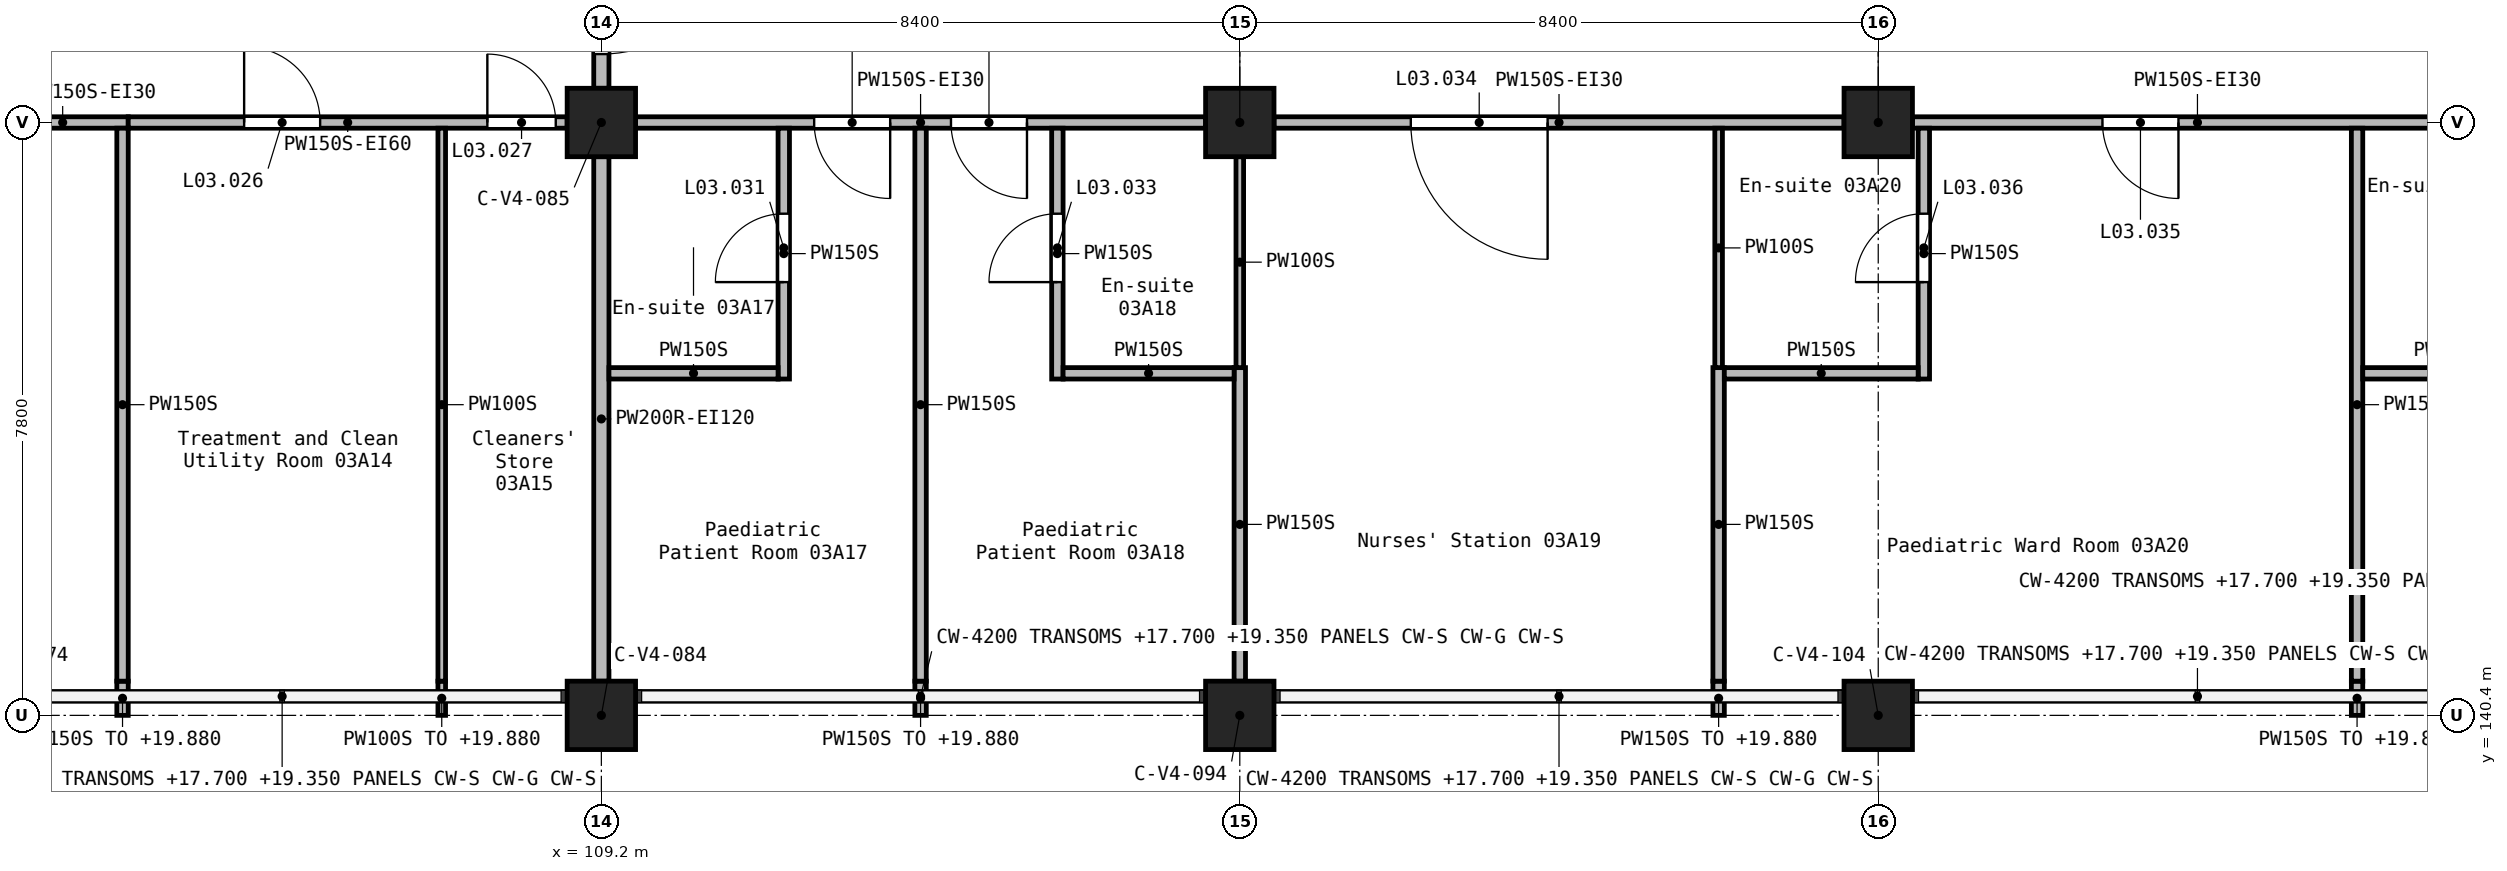
"""IFC4 building model, lengths in metres.
Left out: names, types, materials, properties, quantities, classifications, styles, units other than length and angle.
Written with IfcOpenShell. Run it as: python <this file> out.ifc"""

import sys

from ifc_helpers import new_model, si_unit, direction, frame, frame_2d, origin, origin_2d, place, context, subcontext, project, spatial, rectangle, extrude, element, fill, save


model = new_model("IFC4")
c1 = context("Model", 3, precision=1e-05, world=origin(), true_north=direction((0.0, 1.0)))
c2 = subcontext(c1, "Body", "Model", "MODEL_VIEW")
j1 = project(units=[si_unit("LENGTHUNIT", "METRE"), si_unit("PLANEANGLEUNIT", "RADIAN")], contexts=[c1])
p1 = place(None, origin())
s1 = spatial("IfcSite", under=j1, at=p1, CompositionType="ELEMENT")
p2 = place(p1, origin())
s2 = spatial("IfcBuilding", under=s1, at=p2, CompositionType="ELEMENT")
p3 = place(p2, frame((0.0, 0.0, 16.8)))
s3 = spatial("IfcBuildingStorey", under=s2, at=p3, CompositionType="ELEMENT", Elevation=16.8)
for number, where, z_axis, x_axis in (
    (1, (109.2, 140.4, 0.0), (0.0, 0.0, 1.0), (1.0, 0.0, 0.0)),
    (2, (109.2, 148.2, 0.0), (0.0, 0.0, 1.0), (1.0, 0.0, 0.0)),
    (3, (117.6, 140.4, 0.0), (0.0, 0.0, 1.0), (1.0, 0.0, 0.0)),
    (4, (117.6, 148.2, 0.0), (0.0, 0.0, 1.0), (1.0, 0.0, 0.0)),
    (5, (126.0, 140.4, 0.0), (0.0, 0.0, 1.0), (1.0, 0.0, 0.0)),
    (6, (126.0, 148.2, 0.0), (0.0, 0.0, 1.0), (1.0, 0.0, 0.0)),
):
    element("IfcColumn", number, at=place(p3, frame(where, z_axis=z_axis, x_axis=x_axis)), inside=s3, PredefinedType="COLUMN", context=c2, shape_type="SweptSolid", body=[
        extrude(rectangle(XDim=0.9, YDim=0.9, at=origin_2d()), origin(), (0.0, 0.0, 1.0), 4.2),
    ])
p4 = place(p3, frame((109.2, 151.35, 0.0), z_axis=(0.0, 0.0, 1.0), x_axis=(0.0, -1.0, 0.0)))
e7 = element("IfcWall", 7, at=p4, inside=s3, PredefinedType="SOLIDWALL", context=c2, shape_type="SweptSolid", body=[
    extrude(rectangle(XDim=2.7, YDim=0.2, at=frame_2d((1.35, 0.0))), origin(), (0.0, 0.0, 1.0), 3.9),
])
p5 = place(p4, frame((0.45, 0.0, 0.0)))
e8 = element("IfcOpeningElement", 8, at=p5, cuts=e7, PredefinedType="OPENING", context=c2, shape_type="SweptSolid", body=[
    extrude(rectangle(XDim=1.8, YDim=2.1, at=frame_2d((0.9, 1.05))), frame((0.0, 0.11, 0.0), z_axis=(0.0, -1.0, 0.0), x_axis=(1.0, 0.0, 0.0)), (0.0, 0.0, 1.0), 0.22),
])
p6 = place(p3, frame((109.2, 147.75, 0.0), z_axis=(0.0, 0.0, 1.0), x_axis=(0.0, -1.0, 0.0)))
e9 = element("IfcWall", 9, at=p6, inside=s3, PredefinedType="SOLIDWALL", context=c2, shape_type="SweptSolid", body=[
    extrude(rectangle(XDim=6.9, YDim=0.2, at=frame_2d((3.45, 0.0))), origin(), (0.0, 0.0, 1.0), 3.9),
])
p7 = place(p3, frame((133.95, 148.2, 0.0), z_axis=(0.0, 0.0, 1.0), x_axis=(-1.0, 0.0, 0.0)))
e10 = element("IfcWall", 10, at=p7, inside=s3, PredefinedType="PARTITIONING", context=c2, shape_type="SweptSolid", body=[
    extrude(rectangle(XDim=7.5, YDim=0.15, at=frame_2d((3.75, 0.0))), origin(), (0.0, 0.0, 1.0), 3.9),
])
p8 = place(p7, frame((4.0, 0.0, 0.0)))
e11 = element("IfcOpeningElement", 11, at=p8, cuts=e10, PredefinedType="OPENING", context=c2, shape_type="SweptSolid", body=[
    extrude(rectangle(XDim=1.0, YDim=2.1, at=frame_2d((0.5, 1.05))), frame((0.0, 0.085, 0.0), z_axis=(0.0, -1.0, 0.0), x_axis=(1.0, 0.0, 0.0)), (0.0, 0.0, 1.0), 0.17),
])
p9 = place(p3, frame((125.55, 148.2, 0.0), z_axis=(0.0, 0.0, 1.0), x_axis=(-1.0, 0.0, 0.0)))
e12 = element("IfcWall", 12, at=p9, inside=s3, PredefinedType="PARTITIONING", context=c2, shape_type="SweptSolid", body=[
    extrude(rectangle(XDim=7.5, YDim=0.15, at=frame_2d((3.75, 0.0))), origin(), (0.0, 0.0, 1.0), 3.9),
])
p10 = place(p9, frame((3.9, 0.0, 0.0)))
e13 = element("IfcOpeningElement", 13, at=p10, cuts=e12, PredefinedType="OPENING", context=c2, shape_type="SweptSolid", body=[
    extrude(rectangle(XDim=1.8, YDim=2.1, at=frame_2d((0.9, 1.05))), frame((0.0, 0.085, 0.0), z_axis=(0.0, -1.0, 0.0), x_axis=(1.0, 0.0, 0.0)), (0.0, 0.0, 1.0), 0.17),
])
p11 = place(p3, frame((117.15, 148.2, 0.0), z_axis=(0.0, 0.0, 1.0), x_axis=(-1.0, 0.0, 0.0)))
e14 = element("IfcWall", 14, at=p11, inside=s3, PredefinedType="PARTITIONING", context=c2, shape_type="SweptSolid", body=[
    extrude(rectangle(XDim=7.5, YDim=0.15, at=frame_2d((3.75, 0.0))), origin(), (0.0, 0.0, 1.0), 3.9),
])
p12 = place(p11, frame((4.15, 0.0, 0.0)))
e15 = element("IfcOpeningElement", 15, at=p12, cuts=e14, PredefinedType="OPENING", context=c2, shape_type="SweptSolid", body=[
    extrude(rectangle(XDim=1.0, YDim=2.1, at=frame_2d((0.5, 1.05))), frame((0.0, 0.085, 0.0), z_axis=(0.0, -1.0, 0.0), x_axis=(1.0, 0.0, 0.0)), (0.0, 0.0, 1.0), 0.17),
])
p13 = place(p11, frame((2.35, 0.0, 0.0)))
e16 = element("IfcOpeningElement", 16, at=p13, cuts=e14, PredefinedType="OPENING", context=c2, shape_type="SweptSolid", body=[
    extrude(rectangle(XDim=1.0, YDim=2.1, at=frame_2d((0.5, 1.05))), frame((0.0, 0.085, 0.0), z_axis=(0.0, -1.0, 0.0), x_axis=(1.0, 0.0, 0.0)), (0.0, 0.0, 1.0), 0.17),
])
p14 = place(p3, frame((102.975, 148.2, 0.0), z_axis=(0.0, 0.0, 1.0), x_axis=(-1.0, 0.0, 0.0)))
e17 = element("IfcWall", 17, at=p14, inside=s3, PredefinedType="PARTITIONING", context=c2, shape_type="SweptSolid", body=[
    extrude(rectangle(XDim=1.725, YDim=0.15, at=frame_2d((0.863, 0.0))), origin(), (0.0, 0.0, 1.0), 3.9),
])
p15 = place(p3, frame((102.975, 148.2, 0.0), z_axis=(0.0, 0.0, 1.0), x_axis=(1.0, 0.0, 0.0)))
e18 = element("IfcWall", 18, at=p15, inside=s3, PredefinedType="PARTITIONING", context=c2, shape_type="SweptSolid", body=[
    extrude(rectangle(XDim=5.775, YDim=0.15, at=frame_2d((2.887, 0.0))), origin(), (0.0, 0.0, 1.0), 3.9),
])
p16 = place(p15, frame((1.525, 0.0, 0.0)))
e19 = element("IfcOpeningElement", 19, at=p16, cuts=e18, PredefinedType="OPENING", context=c2, shape_type="SweptSolid", body=[
    extrude(rectangle(XDim=1.0, YDim=2.1, at=frame_2d((0.5, 1.05))), frame((0.0, 0.085, 0.0), z_axis=(0.0, -1.0, 0.0), x_axis=(1.0, 0.0, 0.0)), (0.0, 0.0, 1.0), 0.17),
])
p17 = place(p15, frame((4.725, 0.0, 0.0)))
e20 = element("IfcOpeningElement", 20, at=p17, cuts=e18, PredefinedType="OPENING", context=c2, shape_type="SweptSolid", body=[
    extrude(rectangle(XDim=0.9, YDim=2.1, at=frame_2d((0.45, 1.05))), frame((0.0, 0.085, 0.0), z_axis=(0.0, -1.0, 0.0), x_axis=(1.0, 0.0, 0.0)), (0.0, 0.0, 1.0), 0.17),
])
p18 = place(p3, frame((102.9, 140.4, 0.0), z_axis=(0.0, 0.0, 1.0), x_axis=(0.0, 1.0, 0.0)))
e21 = element("IfcWall", 21, at=p18, inside=s3, PredefinedType="PARTITIONING", context=c2, shape_type="SweptSolid", body=[
    extrude(rectangle(XDim=0.45, YDim=0.15, at=frame_2d((0.225, 0.0))), origin(), (0.0, 0.0, 1.0), 3.08),
])
p19 = place(p3, frame((102.9, 140.85, 0.0), z_axis=(0.0, 0.0, 1.0), x_axis=(0.0, 1.0, 0.0)))
e22 = element("IfcWall", 22, at=p19, inside=s3, PredefinedType="PARTITIONING", context=c2, shape_type="SweptSolid", body=[
    extrude(rectangle(XDim=7.275, YDim=0.15, at=frame_2d((3.637, 0.0))), origin(), (0.0, 0.0, 1.0), 3.9),
])
p20 = place(p3, frame((113.4, 140.4, 0.0), z_axis=(0.0, 0.0, 1.0), x_axis=(0.0, 1.0, 0.0)))
e23 = element("IfcWall", 23, at=p20, inside=s3, PredefinedType="PARTITIONING", context=c2, shape_type="SweptSolid", body=[
    extrude(rectangle(XDim=0.45, YDim=0.15, at=frame_2d((0.225, 0.0))), origin(), (0.0, 0.0, 1.0), 3.08),
])
p21 = place(p3, frame((113.4, 140.85, 0.0), z_axis=(0.0, 0.0, 1.0), x_axis=(0.0, 1.0, 0.0)))
e24 = element("IfcWall", 24, at=p21, inside=s3, PredefinedType="PARTITIONING", context=c2, shape_type="SweptSolid", body=[
    extrude(rectangle(XDim=7.275, YDim=0.15, at=frame_2d((3.637, 0.0))), origin(), (0.0, 0.0, 1.0), 3.9),
])
p22 = place(p3, frame((132.3, 140.4, 0.0), z_axis=(0.0, 0.0, 1.0), x_axis=(0.0, 1.0, 0.0)))
e25 = element("IfcWall", 25, at=p22, inside=s3, PredefinedType="PARTITIONING", context=c2, shape_type="SweptSolid", body=[
    extrude(rectangle(XDim=0.45, YDim=0.15, at=frame_2d((0.225, 0.0))), origin(), (0.0, 0.0, 1.0), 3.08),
])
p23 = place(p3, frame((132.3, 140.85, 0.0), z_axis=(0.0, 0.0, 1.0), x_axis=(0.0, 1.0, 0.0)))
e26 = element("IfcWall", 26, at=p23, inside=s3, PredefinedType="PARTITIONING", context=c2, shape_type="SweptSolid", body=[
    extrude(rectangle(XDim=7.275, YDim=0.15, at=frame_2d((3.637, 0.0))), origin(), (0.0, 0.0, 1.0), 3.9),
])
p24 = place(p3, frame((117.6, 140.85, 0.0), z_axis=(0.0, 0.0, 1.0), x_axis=(0.0, 1.0, 0.0)))
e27 = element("IfcWall", 27, at=p24, inside=s3, PredefinedType="PARTITIONING", context=c2, shape_type="SweptSolid", body=[
    extrude(rectangle(XDim=4.125, YDim=0.15, at=frame_2d((2.062, 0.0))), origin(), (0.0, 0.0, 1.0), 3.9),
])
p25 = place(p3, frame((123.9, 140.4, 0.0), z_axis=(0.0, 0.0, 1.0), x_axis=(0.0, 1.0, 0.0)))
e28 = element("IfcWall", 28, at=p25, inside=s3, PredefinedType="PARTITIONING", context=c2, shape_type="SweptSolid", body=[
    extrude(rectangle(XDim=0.45, YDim=0.15, at=frame_2d((0.225, 0.0))), origin(), (0.0, 0.0, 1.0), 3.08),
])
p26 = place(p3, frame((123.9, 140.85, 0.0), z_axis=(0.0, 0.0, 1.0), x_axis=(0.0, 1.0, 0.0)))
e29 = element("IfcWall", 29, at=p26, inside=s3, PredefinedType="PARTITIONING", context=c2, shape_type="SweptSolid", body=[
    extrude(rectangle(XDim=4.125, YDim=0.15, at=frame_2d((2.062, 0.0))), origin(), (0.0, 0.0, 1.0), 3.9),
])
p27 = place(p3, frame((111.6, 144.825, 0.0), z_axis=(0.0, 0.0, 1.0), x_axis=(0.0, 1.0, 0.0)))
e30 = element("IfcWall", 30, at=p27, inside=s3, PredefinedType="PARTITIONING", context=c2, shape_type="SweptSolid", body=[
    extrude(rectangle(XDim=3.3, YDim=0.15, at=frame_2d((1.65, 0.0))), origin(), (0.0, 0.0, 1.0), 3.9),
])
p28 = place(p27, frame((1.275, 0.0, 0.0)))
e31 = element("IfcOpeningElement", 31, at=p28, cuts=e30, PredefinedType="OPENING", context=c2, shape_type="SweptSolid", body=[
    extrude(rectangle(XDim=0.9, YDim=2.1, at=frame_2d((0.45, 1.05))), frame((0.0, 0.085, 0.0), z_axis=(0.0, -1.0, 0.0), x_axis=(1.0, 0.0, 0.0)), (0.0, 0.0, 1.0), 0.17),
])
p29 = place(p3, frame((115.2, 144.825, 0.0), z_axis=(0.0, 0.0, 1.0), x_axis=(0.0, 1.0, 0.0)))
e32 = element("IfcWall", 32, at=p29, inside=s3, PredefinedType="PARTITIONING", context=c2, shape_type="SweptSolid", body=[
    extrude(rectangle(XDim=3.3, YDim=0.15, at=frame_2d((1.65, 0.0))), origin(), (0.0, 0.0, 1.0), 3.9),
])
p30 = place(p29, frame((1.275, 0.0, 0.0)))
e33 = element("IfcOpeningElement", 33, at=p30, cuts=e32, PredefinedType="OPENING", context=c2, shape_type="SweptSolid", body=[
    extrude(rectangle(XDim=0.9, YDim=2.1, at=frame_2d((0.45, 1.05))), frame((0.0, 0.085, 0.0), z_axis=(0.0, -1.0, 0.0), x_axis=(1.0, 0.0, 0.0)), (0.0, 0.0, 1.0), 0.17),
])
p31 = place(p3, frame((126.6, 144.825, 0.0), z_axis=(0.0, 0.0, 1.0), x_axis=(0.0, 1.0, 0.0)))
e34 = element("IfcWall", 34, at=p31, inside=s3, PredefinedType="PARTITIONING", context=c2, shape_type="SweptSolid", body=[
    extrude(rectangle(XDim=3.3, YDim=0.15, at=frame_2d((1.65, 0.0))), origin(), (0.0, 0.0, 1.0), 3.9),
])
p32 = place(p31, frame((1.275, 0.0, 0.0)))
e35 = element("IfcOpeningElement", 35, at=p32, cuts=e34, PredefinedType="OPENING", context=c2, shape_type="SweptSolid", body=[
    extrude(rectangle(XDim=0.9, YDim=2.1, at=frame_2d((0.45, 1.05))), frame((0.0, 0.085, 0.0), z_axis=(0.0, -1.0, 0.0), x_axis=(1.0, 0.0, 0.0)), (0.0, 0.0, 1.0), 0.17),
])
p33 = place(p3, frame((123.975, 144.9, 0.0), z_axis=(0.0, 0.0, 1.0), x_axis=(1.0, 0.0, 0.0)))
e36 = element("IfcWall", 36, at=p33, inside=s3, PredefinedType="PARTITIONING", context=c2, shape_type="SweptSolid", body=[
    extrude(rectangle(XDim=2.55, YDim=0.15, at=frame_2d((1.275, 0.0))), origin(), (0.0, 0.0, 1.0), 3.9),
])
p34 = place(p3, frame((109.3, 144.9, 0.0), z_axis=(0.0, 0.0, 1.0), x_axis=(1.0, 0.0, 0.0)))
e37 = element("IfcWall", 37, at=p34, inside=s3, PredefinedType="PARTITIONING", context=c2, shape_type="SweptSolid", body=[
    extrude(rectangle(XDim=2.225, YDim=0.15, at=frame_2d((1.112, 0.0))), origin(), (0.0, 0.0, 1.0), 3.9),
])
for number, where, z_axis, x_axis in (
    (38, (115.275, 144.9, 0.0), (0.0, 0.0, 1.0), (1.0, 0.0, 0.0)),
    (39, (132.375, 144.9, 0.0), (0.0, 0.0, 1.0), (1.0, 0.0, 0.0)),
):
    element("IfcWall", number, at=place(p3, frame(where, z_axis=z_axis, x_axis=x_axis)), inside=s3, PredefinedType="PARTITIONING", context=c2, shape_type="SweptSolid", body=[
        extrude(rectangle(XDim=2.25, YDim=0.15, at=frame_2d((1.125, 0.0))), origin(), (0.0, 0.0, 1.0), 3.9),
    ])
p35 = place(p3, frame((107.1, 140.4, 0.0), z_axis=(0.0, 0.0, 1.0), x_axis=(0.0, 1.0, 0.0)))
e40 = element("IfcWall", 40, at=p35, inside=s3, PredefinedType="PARTITIONING", context=c2, shape_type="SweptSolid", body=[
    extrude(rectangle(XDim=0.45, YDim=0.1, at=frame_2d((0.225, 0.0))), origin(), (0.0, 0.0, 1.0), 3.08),
])
p36 = place(p3, frame((107.1, 140.85, 0.0), z_axis=(0.0, 0.0, 1.0), x_axis=(0.0, 1.0, 0.0)))
e41 = element("IfcWall", 41, at=p36, inside=s3, PredefinedType="PARTITIONING", context=c2, shape_type="SweptSolid", body=[
    extrude(rectangle(XDim=7.275, YDim=0.1, at=frame_2d((3.637, 0.0))), origin(), (0.0, 0.0, 1.0), 3.9),
])
p37 = place(p3, frame((117.6, 144.975, 0.0), z_axis=(0.0, 0.0, 1.0), x_axis=(0.0, 1.0, 0.0)))
e42 = element("IfcWall", 42, at=p37, inside=s3, PredefinedType="PARTITIONING", context=c2, shape_type="SweptSolid", body=[
    extrude(rectangle(XDim=2.775, YDim=0.1, at=frame_2d((1.387, 0.0))), origin(), (0.0, 0.0, 1.0), 3.9),
])
p38 = place(p3, frame((123.9, 144.975, 0.0), z_axis=(0.0, 0.0, 1.0), x_axis=(0.0, 1.0, 0.0)))
e43 = element("IfcWall", 43, at=p38, inside=s3, PredefinedType="PARTITIONING", context=c2, shape_type="SweptSolid", body=[
    extrude(rectangle(XDim=3.15, YDim=0.1, at=frame_2d((1.575, 0.0))), origin(), (0.0, 0.0, 1.0), 3.9),
])
p39 = place(p5, origin())
e44 = element("IfcDoor", 44, at=p39, inside=s3, OperationType="DOUBLE_DOOR_SINGLE_SWING", PredefinedType="DOOR", context=c2, shape_type="SweptSolid", body=[
    extrude(rectangle(XDim=1.8, YDim=2.1, at=frame_2d((0.9, 1.05))), frame((0.0, 0.025, 0.0), z_axis=(0.0, -1.0, 0.0), x_axis=(1.0, 0.0, 0.0)), (0.0, 0.0, 1.0), 0.05),
])
fill(e8, e44)
p40 = place(p16, frame((1.0, 0.0, 0.0), z_axis=(0.0, 0.0, 1.0), x_axis=(-1.0, 0.0, 0.0)))
e45 = element("IfcDoor", 45, at=p40, inside=s3, OperationType="SINGLE_SWING_RIGHT", PredefinedType="DOOR", context=c2, shape_type="SweptSolid", body=[
    extrude(rectangle(XDim=1.0, YDim=2.1, at=frame_2d((0.5, 1.05))), frame((0.0, 0.025, 0.0), z_axis=(0.0, -1.0, 0.0), x_axis=(1.0, 0.0, 0.0)), (0.0, 0.0, 1.0), 0.05),
])
fill(e19, e45)
p41 = place(p17, frame((0.9, 0.0, 0.0), z_axis=(0.0, 0.0, 1.0), x_axis=(-1.0, 0.0, 0.0)))
e46 = element("IfcDoor", 46, at=p41, inside=s3, OperationType="SINGLE_SWING_LEFT", PredefinedType="DOOR", context=c2, shape_type="SweptSolid", body=[
    extrude(rectangle(XDim=0.9, YDim=2.1, at=frame_2d((0.45, 1.05))), frame((0.0, 0.025, 0.0), z_axis=(0.0, -1.0, 0.0), x_axis=(1.0, 0.0, 0.0)), (0.0, 0.0, 1.0), 0.05),
])
fill(e20, e46)
p42 = place(p12, origin())
e47 = element("IfcDoor", 47, at=p42, inside=s3, OperationType="SINGLE_SWING_RIGHT", PredefinedType="DOOR", context=c2, shape_type="SweptSolid", body=[
    extrude(rectangle(XDim=1.0, YDim=2.1, at=frame_2d((0.5, 1.05))), frame((0.0, 0.025, 0.0), z_axis=(0.0, -1.0, 0.0), x_axis=(1.0, 0.0, 0.0)), (0.0, 0.0, 1.0), 0.05),
])
fill(e15, e47)
p43 = place(p28, origin())
e48 = element("IfcDoor", 48, at=p43, inside=s3, OperationType="SINGLE_SWING_RIGHT", PredefinedType="DOOR", context=c2, shape_type="SweptSolid", body=[
    extrude(rectangle(XDim=0.9, YDim=2.1, at=frame_2d((0.45, 1.05))), frame((0.0, 0.025, 0.0), z_axis=(0.0, -1.0, 0.0), x_axis=(1.0, 0.0, 0.0)), (0.0, 0.0, 1.0), 0.05),
])
fill(e31, e48)
p44 = place(p13, origin())
e49 = element("IfcDoor", 49, at=p44, inside=s3, OperationType="SINGLE_SWING_LEFT", PredefinedType="DOOR", context=c2, shape_type="SweptSolid", body=[
    extrude(rectangle(XDim=1.0, YDim=2.1, at=frame_2d((0.5, 1.05))), frame((0.0, 0.025, 0.0), z_axis=(0.0, -1.0, 0.0), x_axis=(1.0, 0.0, 0.0)), (0.0, 0.0, 1.0), 0.05),
])
fill(e16, e49)
p45 = place(p30, frame((0.9, 0.0, 0.0), z_axis=(0.0, 0.0, 1.0), x_axis=(-1.0, 0.0, 0.0)))
e50 = element("IfcDoor", 50, at=p45, inside=s3, OperationType="SINGLE_SWING_LEFT", PredefinedType="DOOR", context=c2, shape_type="SweptSolid", body=[
    extrude(rectangle(XDim=0.9, YDim=2.1, at=frame_2d((0.45, 1.05))), frame((0.0, 0.025, 0.0), z_axis=(0.0, -1.0, 0.0), x_axis=(1.0, 0.0, 0.0)), (0.0, 0.0, 1.0), 0.05),
])
fill(e33, e50)
p46 = place(p10, origin())
e51 = element("IfcDoor", 51, at=p46, inside=s3, OperationType="DOUBLE_DOOR_SINGLE_SWING", PredefinedType="DOOR", context=c2, shape_type="SweptSolid", body=[
    extrude(rectangle(XDim=1.8, YDim=2.1, at=frame_2d((0.9, 1.05))), frame((0.0, 0.025, 0.0), z_axis=(0.0, -1.0, 0.0), x_axis=(1.0, 0.0, 0.0)), (0.0, 0.0, 1.0), 0.05),
])
fill(e13, e51)
p47 = place(p8, origin())
e52 = element("IfcDoor", 52, at=p47, inside=s3, OperationType="SINGLE_SWING_RIGHT", PredefinedType="DOOR", context=c2, shape_type="SweptSolid", body=[
    extrude(rectangle(XDim=1.0, YDim=2.1, at=frame_2d((0.5, 1.05))), frame((0.0, 0.025, 0.0), z_axis=(0.0, -1.0, 0.0), x_axis=(1.0, 0.0, 0.0)), (0.0, 0.0, 1.0), 0.05),
])
fill(e11, e52)
p48 = place(p32, origin())
e53 = element("IfcDoor", 53, at=p48, inside=s3, OperationType="SINGLE_SWING_RIGHT", PredefinedType="DOOR", context=c2, shape_type="SweptSolid", body=[
    extrude(rectangle(XDim=0.9, YDim=2.1, at=frame_2d((0.45, 1.05))), frame((0.0, 0.025, 0.0), z_axis=(0.0, -1.0, 0.0), x_axis=(1.0, 0.0, 0.0)), (0.0, 0.0, 1.0), 0.05),
])
fill(e35, e53)
save(model, sys.argv[1])
